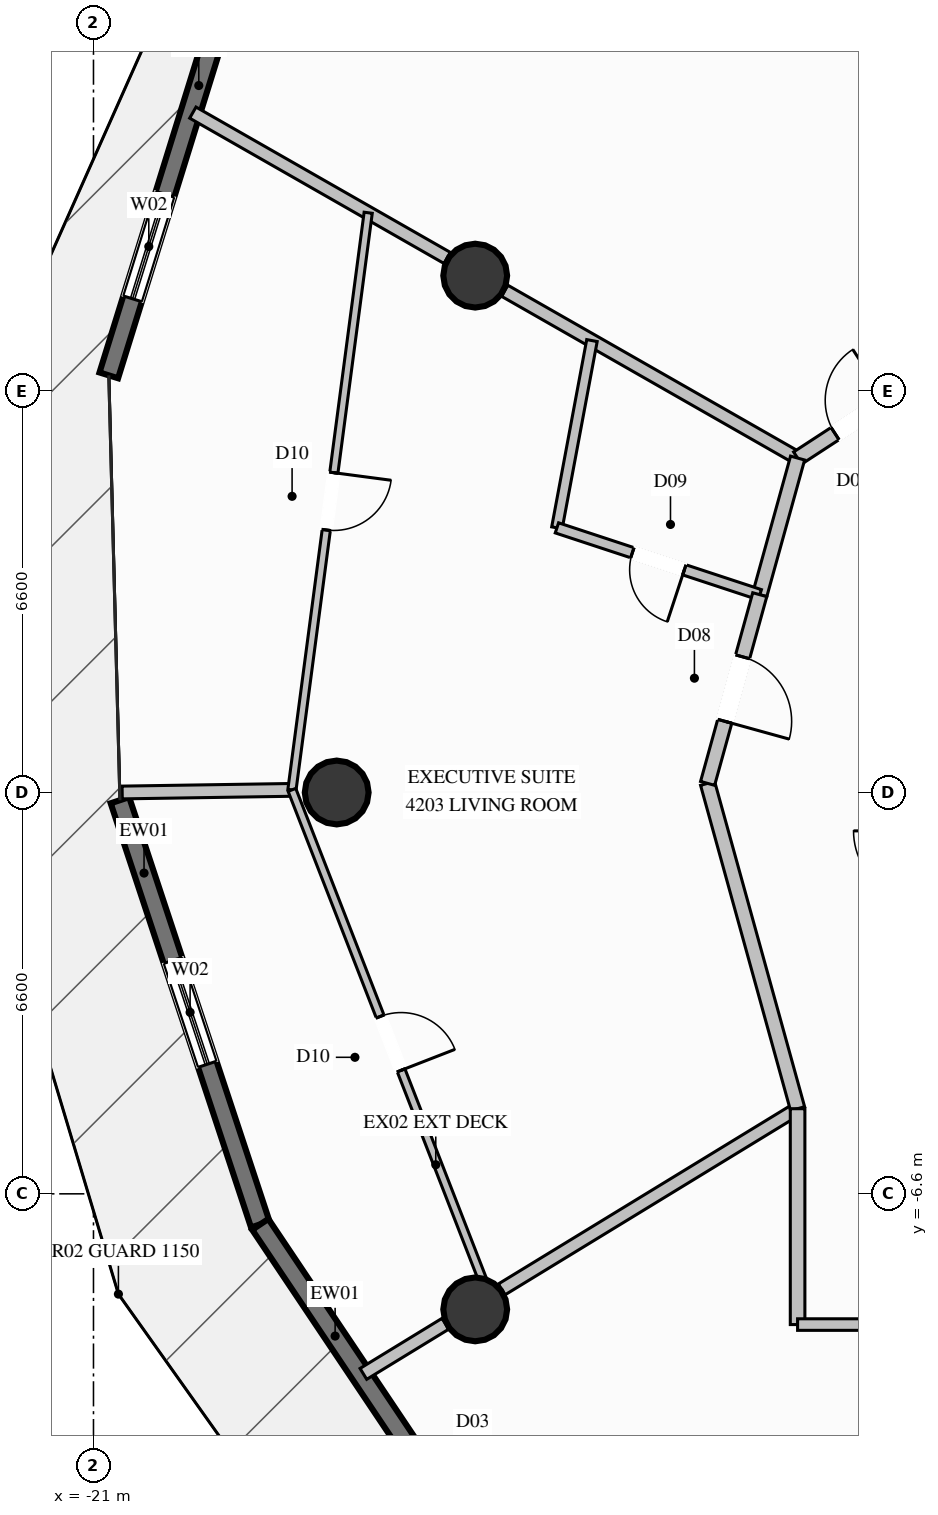
"""IFC4 building model, lengths in metres.
Left out: names, types, materials, properties, quantities, classifications, styles, units other than length and angle.
Written with IfcOpenShell. Run it as: python <this file> out.ifc"""

import sys

from ifc_helpers import new_model, si_unit, direction, frame, frame_2d, origin, origin_2d, place, context, subcontext, project, spatial, rectangle, circle, extrude, element, fill, save


model = new_model("IFC4")
c1 = context("Model", 3, precision=1e-05, world=origin(), true_north=direction((0.0, 1.0)))
c2 = subcontext(c1, "Body", "Model", "MODEL_VIEW")
j1 = project(units=[si_unit("LENGTHUNIT", "METRE"), si_unit("PLANEANGLEUNIT", "RADIAN")], contexts=[c1])
p1 = place(None, origin())
s1 = spatial("IfcSite", under=j1, at=p1, CompositionType="ELEMENT")
p2 = place(p1, origin())
s2 = spatial("IfcBuilding", under=s1, at=p2, CompositionType="ELEMENT")
p3 = place(p2, frame((0.0, 0.0, 156.6)))
s3 = spatial("IfcBuildingStorey", under=s2, at=p3, CompositionType="ELEMENT", Elevation=156.6)
for number, where, z_axis, x_axis in (
    (1, (-14.722, 8.5, 0.0), (0.0, 0.0, 1.0), (1.0, 0.0, 0.0)),
    (2, (-17.0, 0.0, 0.0), (0.0, 0.0, 1.0), (1.0, 0.0, 0.0)),
    (3, (-14.722, -8.5, 0.0), (0.0, 0.0, 1.0), (1.0, 0.0, 0.0)),
):
    element("IfcColumn", number, at=place(p3, frame(where, z_axis=z_axis, x_axis=x_axis)), inside=s3, PredefinedType="COLUMN", context=c2, shape_type="SweptSolid", body=[
        extrude(circle(Radius=0.525, at=origin_2d()), origin(), (0.0, 0.0, 1.0), 3.6),
    ])
p4 = place(p3, frame((-20.748, 6.86, 0.0), z_axis=(0.0, 0.0, 1.0), x_axis=(0.296513005153, 0.955028815154, 0.0)))
e4 = element("IfcWall", 4, at=p4, inside=s3, PredefinedType="SOLIDWALL", context=c2, shape_type="SweptSolid", body=[
    extrude(rectangle(XDim=6.613, YDim=0.32, at=frame_2d((3.307, 0.0))), origin(), (0.0, 0.0, 1.0), 3.35),
])
p5 = place(p4, frame((1.318, 0.0, 0.35)))
e5 = element("IfcOpeningElement", 5, at=p5, cuts=e4, PredefinedType="OPENING", context=c2, shape_type="SweptSolid", body=[
    extrude(rectangle(XDim=1.8, YDim=2.6, at=frame_2d((0.9, 1.3))), frame((0.0, 0.17, 0.0), z_axis=(0.0, -1.0, 0.0), x_axis=(1.0, 0.0, 0.0)), (0.0, 0.0, 1.0), 0.34),
])
p6 = place(p3, frame((-18.257, -7.102, 0.0), z_axis=(0.0, 0.0, 1.0), x_axis=(-0.314123527442, 0.949382119859, 0.0)))
e6 = element("IfcWall", 6, at=p6, inside=s3, PredefinedType="SOLIDWALL", context=c2, shape_type="SweptSolid", body=[
    extrude(rectangle(XDim=7.347, YDim=0.32, at=frame_2d((3.673, 0.0))), origin(), (0.0, 0.0, 1.0), 3.35),
])
p7 = place(p6, frame((2.773, 0.0, 0.35)))
e7 = element("IfcOpeningElement", 7, at=p7, cuts=e6, PredefinedType="OPENING", context=c2, shape_type="SweptSolid", body=[
    extrude(rectangle(XDim=1.8, YDim=2.6, at=frame_2d((0.9, 1.3))), frame((0.0, 0.17, 0.0), z_axis=(0.0, -1.0, 0.0), x_axis=(1.0, 0.0, 0.0)), (0.0, 0.0, 1.0), 0.34),
])
p8 = place(p3, frame((-14.049, -13.381, 0.0), z_axis=(0.0, 0.0, 1.0), x_axis=(-0.556711069725, 0.830706196465, 0.0)))
e8 = element("IfcWall", 8, at=p8, inside=s3, PredefinedType="SOLIDWALL", context=c2, shape_type="SweptSolid", body=[
    extrude(rectangle(XDim=7.559, YDim=0.32, at=frame_2d((3.779, 0.0))), origin(), (0.0, 0.0, 1.0), 3.35),
])
p9 = place(p8, frame((1.786, 0.0, 0.0)))
e9 = element("IfcOpeningElement", 9, at=p9, cuts=e8, PredefinedType="OPENING", context=c2, shape_type="SweptSolid", body=[
    extrude(rectangle(XDim=1.1, YDim=2.2, at=frame_2d((0.55, 1.1))), frame((0.0, 0.17, 0.0), z_axis=(0.0, -1.0, 0.0), x_axis=(1.0, 0.0, 0.0)), (0.0, 0.0, 1.0), 0.34),
])
p10 = place(p3, frame((-9.42, 5.5, 0.0), z_axis=(0.0, 0.0, 1.0), x_axis=(-0.868373112855, 0.495911420387, 0.0)))
e10 = element("IfcWall", 10, at=p10, inside=s3, PredefinedType="PARTITIONING", context=c2, shape_type="SweptSolid", body=[
    extrude(rectangle(XDim=5.547, YDim=0.21, at=frame_2d((2.774, 0.0))), origin(), (0.0, 0.0, 1.0), 2.717),
])
p11 = place(p3, frame((-15.183, 8.791, 0.0), z_axis=(0.0, 0.0, 1.0), x_axis=(-0.868271208713, 0.496089818601, 0.0)))
e11 = element("IfcWall", 11, at=p11, inside=s3, PredefinedType="PARTITIONING", context=c2, shape_type="SweptSolid", body=[
    extrude(rectangle(XDim=4.817, YDim=0.21, at=frame_2d((2.409, 0.0))), origin(), (0.0, 0.0, 1.0), 3.35),
])
p12 = place(p3, frame((-9.42, -5.2, 0.0), z_axis=(0.0, 0.0, 1.0), x_axis=(-0.853455334267, -0.521165993146, 0.0)))
e12 = element("IfcWall", 12, at=p12, inside=s3, PredefinedType="PARTITIONING", context=c2, shape_type="SweptSolid", body=[
    extrude(rectangle(XDim=5.703, YDim=0.21, at=frame_2d((2.852, 0.0))), origin(), (0.0, 0.0, 1.0), 2.717),
])
p13 = place(p3, frame((-15.213, -8.737, 0.0), z_axis=(0.0, 0.0, 1.0), x_axis=(-0.853251275715, -0.521500010058, 0.0)))
e13 = element("IfcWall", 13, at=p13, inside=s3, PredefinedType="PARTITIONING", context=c2, shape_type="SweptSolid", body=[
    extrude(rectangle(XDim=1.58, YDim=0.21, at=frame_2d((0.79, 0.0))), origin(), (0.0, 0.0, 1.0), 3.35),
])
p14 = place(p3, frame((-9.42, 5.5, 0.0), z_axis=(0.0, 0.0, 1.0), x_axis=(0.837571286912, 0.546328051029, 0.0)))
e14 = element("IfcWall", 14, at=p14, inside=s3, PredefinedType="PARTITIONING", context=c2, shape_type="SweptSolid", body=[
    extrude(rectangle(XDim=2.471, YDim=0.24, at=frame_2d((1.236, 0.0))), origin(), (0.0, 0.0, 1.0), 3.35),
])
p15 = place(p14, frame((0.736, 0.0, 0.0)))
e15 = element("IfcOpeningElement", 15, at=p15, cuts=e14, PredefinedType="OPENING", context=c2, shape_type="SweptSolid", body=[
    extrude(rectangle(XDim=1.0, YDim=2.2, at=frame_2d((0.5, 1.1))), frame((0.0, 0.13, 0.0), z_axis=(0.0, -1.0, 0.0), x_axis=(1.0, 0.0, 0.0)), (0.0, 0.0, 1.0), 0.26),
])
p16 = place(p3, frame((-9.42, 5.5, 0.0), z_axis=(0.0, 0.0, 1.0), x_axis=(-0.266801280383, -0.963751563831, 0.0)))
e16 = element("IfcWall", 16, at=p16, inside=s3, PredefinedType="PARTITIONING", context=c2, shape_type="SweptSolid", body=[
    extrude(rectangle(XDim=2.332, YDim=0.24, at=frame_2d((1.166, 0.0))), origin(), (0.0, 0.0, 1.0), 3.35),
])
p17 = place(p3, frame((-12.802, 7.432, 0.0), z_axis=(0.0, 0.0, 1.0), x_axis=(-0.183813348356, -0.982961165543, 0.0)))
e17 = element("IfcWall", 17, at=p17, inside=s3, PredefinedType="PLUMBINGWALL", context=c2, shape_type="SweptSolid", body=[
    extrude(rectangle(XDim=3.133, YDim=0.175, at=frame_2d((1.567, 0.0))), origin(), (0.0, 0.0, 1.0), 3.35),
])
p18 = place(p3, frame((-10.042, 3.253, 0.0), z_axis=(0.0, 0.0, 1.0), x_axis=(-0.949775824576, 0.312931115504, 0.0)))
e18 = element("IfcWall", 18, at=p18, inside=s3, PredefinedType="PLUMBINGWALL", context=c2, shape_type="SweptSolid", body=[
    extrude(rectangle(XDim=3.512, YDim=0.175, at=frame_2d((1.756, 0.0))), origin(), (0.0, 0.0, 1.0), 3.35),
])
p19 = place(p18, frame((1.306, 0.0, 0.0)))
e19 = element("IfcOpeningElement", 19, at=p19, cuts=e18, PredefinedType="OPENING", context=c2, shape_type="SweptSolid", body=[
    extrude(rectangle(XDim=0.9, YDim=2.1, at=frame_2d((0.45, 1.05))), frame((0.0, 0.098, 0.0), z_axis=(0.0, -1.0, 0.0), x_axis=(1.0, 0.0, 0.0)), (0.0, 0.0, 1.0), 0.195),
])
p20 = place(p3, frame((-17.736, 0.043, 0.0), z_axis=(0.0, 0.0, 1.0), x_axis=(-0.999881595037, -0.01538817425, 0.0)))
e20 = element("IfcWall", 20, at=p20, inside=s3, PredefinedType="PARTITIONING", context=c2, shape_type="SweptSolid", body=[
    extrude(rectangle(XDim=2.792, YDim=0.21, at=frame_2d((1.396, 0.0))), origin(), (0.0, 0.0, 1.0), 3.35),
])
p21 = place(p3, frame((-10.9, 0.15, 0.0), z_axis=(0.0, 0.0, 1.0), x_axis=(0.266625172958, -0.963800299411, 0.0)))
e21 = element("IfcWall", 21, at=p21, inside=s3, PredefinedType="PARTITIONING", context=c2, shape_type="SweptSolid", body=[
    extrude(rectangle(XDim=5.551, YDim=0.24, at=frame_2d((2.775, 0.0))), origin(), (0.0, 0.0, 1.0), 3.35),
])
p22 = place(p3, frame((-10.042, 3.253, 0.0), z_axis=(0.0, 0.0, 1.0), x_axis=(-0.266478138733, -0.963840962803, 0.0)))
e22 = element("IfcWall", 22, at=p22, inside=s3, PredefinedType="PARTITIONING", context=c2, shape_type="SweptSolid", body=[
    extrude(rectangle(XDim=3.219, YDim=0.24, at=frame_2d((1.61, 0.0))), origin(), (0.0, 0.0, 1.0), 3.35),
])
p23 = place(p22, frame((1.06, 0.0, 0.0)))
e23 = element("IfcOpeningElement", 23, at=p23, cuts=e22, PredefinedType="OPENING", context=c2, shape_type="SweptSolid", body=[
    extrude(rectangle(XDim=1.1, YDim=2.3, at=frame_2d((0.55, 1.15))), frame((0.0, 0.13, 0.0), z_axis=(0.0, -1.0, 0.0), x_axis=(1.0, 0.0, 0.0)), (0.0, 0.0, 1.0), 0.26),
])
p24 = place(p3, frame((-16.482, 9.534, 0.0), z_axis=(0.0, 0.0, 1.0), x_axis=(-0.131002685595, -0.991382013336, 0.0)))
e24 = element("IfcWall", 24, at=p24, inside=s3, PredefinedType="PARTITIONING", context=c2, shape_type="SweptSolid", body=[
    extrude(rectangle(XDim=9.573, YDim=0.135, at=frame_2d((4.787, 0.0))), origin(), (0.0, 0.0, 1.0), 3.35),
])
p25 = place(p24, frame((4.312, 0.0, 0.0)))
e25 = element("IfcOpeningElement", 25, at=p25, cuts=e24, PredefinedType="OPENING", context=c2, shape_type="SweptSolid", body=[
    extrude(rectangle(XDim=0.95, YDim=2.1, at=frame_2d((0.475, 1.05))), frame((0.0, 0.078, 0.0), z_axis=(0.0, -1.0, 0.0), x_axis=(1.0, 0.0, 0.0)), (0.0, 0.0, 1.0), 0.155),
])
p26 = place(p3, frame((-17.736, 0.043, 0.0), z_axis=(0.0, 0.0, 1.0), x_axis=(0.362756961883, -0.931883783851, 0.0)))
e26 = element("IfcWall", 26, at=p26, inside=s3, PredefinedType="PARTITIONING", context=c2, shape_type="SweptSolid", body=[
    extrude(rectangle(XDim=8.948, YDim=0.135, at=frame_2d((4.474, 0.0))), origin(), (0.0, 0.0, 1.0), 2.878),
])
p27 = place(p26, frame((3.999, 0.0, 0.0)))
e27 = element("IfcOpeningElement", 27, at=p27, cuts=e26, PredefinedType="OPENING", context=c2, shape_type="SweptSolid", body=[
    extrude(rectangle(XDim=0.95, YDim=2.1, at=frame_2d((0.475, 1.05))), frame((0.0, 0.078, 0.0), z_axis=(0.0, -1.0, 0.0), x_axis=(1.0, 0.0, 0.0)), (0.0, 0.0, 1.0), 0.155),
])
p28 = place(p3, frame((-9.42, -5.2, 0.0), z_axis=(0.0, 0.0, 1.0), x_axis=(0.0, -1.0, 0.0)))
e28 = element("IfcWall", 28, at=p28, inside=s3, PredefinedType="PARTITIONING", context=c2, shape_type="SweptSolid", body=[
    extrude(rectangle(XDim=3.55, YDim=0.24, at=frame_2d((1.775, 0.0))), origin(), (0.0, 0.0, 1.0), 3.35),
])
p29 = place(p3, frame((-9.42, -8.75, 0.0), z_axis=(0.0, 0.0, 1.0), x_axis=(1.0, 0.0, 0.0)))
e29 = element("IfcWall", 29, at=p29, inside=s3, PredefinedType="PARTITIONING", context=c2, shape_type="SweptSolid", body=[
    extrude(rectangle(XDim=4.239, YDim=0.19, at=frame_2d((2.12, 0.0))), origin(), (0.0, 0.0, 1.0), 3.35),
])
p30 = place(p29, frame((1.644, 0.0, 0.0)))
e30 = element("IfcOpeningElement", 30, at=p30, cuts=e29, PredefinedType="OPENING", context=c2, shape_type="SweptSolid", body=[
    extrude(rectangle(XDim=0.95, YDim=2.1, at=frame_2d((0.475, 1.05))), frame((0.0, 0.105, 0.0), z_axis=(0.0, -1.0, 0.0), x_axis=(1.0, 0.0, 0.0)), (0.0, 0.0, 1.0), 0.21),
])
p31 = place(p5, origin())
e31 = element("IfcWindow", 31, at=p31, inside=s3, PartitioningType="SINGLE_PANEL", PredefinedType="WINDOW", context=c2, shape_type="SweptSolid", body=[
    extrude(rectangle(XDim=1.8, YDim=2.6, at=frame_2d((0.9, 1.3))), frame((0.0, 0.03, 0.0), z_axis=(0.0, -1.0, 0.0), x_axis=(1.0, 0.0, 0.0)), (0.0, 0.0, 1.0), 0.06),
])
fill(e5, e31)
p32 = place(p7, origin())
e32 = element("IfcWindow", 32, at=p32, inside=s3, PartitioningType="SINGLE_PANEL", PredefinedType="WINDOW", context=c2, shape_type="SweptSolid", body=[
    extrude(rectangle(XDim=1.8, YDim=2.6, at=frame_2d((0.9, 1.3))), frame((0.0, 0.03, 0.0), z_axis=(0.0, -1.0, 0.0), x_axis=(1.0, 0.0, 0.0)), (0.0, 0.0, 1.0), 0.06),
])
fill(e7, e32)
p33 = place(p15, origin())
e33 = element("IfcDoor", 33, at=p33, inside=s3, OperationType="SINGLE_SWING_RIGHT", PredefinedType="DOOR", context=c2, shape_type="SweptSolid", body=[
    extrude(rectangle(XDim=1.0, YDim=2.2, at=frame_2d((0.5, 1.1))), frame((0.0, 0.025, 0.0), z_axis=(0.0, -1.0, 0.0), x_axis=(1.0, 0.0, 0.0)), (0.0, 0.0, 1.0), 0.05),
])
fill(e15, e33)
p34 = place(p19, origin())
e34 = element("IfcDoor", 34, at=p34, inside=s3, OperationType="SINGLE_SWING_LEFT", PredefinedType="DOOR", context=c2, shape_type="SweptSolid", body=[
    extrude(rectangle(XDim=0.9, YDim=2.1, at=frame_2d((0.45, 1.05))), frame((0.0, 0.025, 0.0), z_axis=(0.0, -1.0, 0.0), x_axis=(1.0, 0.0, 0.0)), (0.0, 0.0, 1.0), 0.05),
])
fill(e19, e34)
p35 = place(p23, origin())
e35 = element("IfcDoor", 35, at=p35, inside=s3, OperationType="SINGLE_SWING_RIGHT", PredefinedType="DOOR", context=c2, shape_type="SweptSolid", body=[
    extrude(rectangle(XDim=1.1, YDim=2.3, at=frame_2d((0.55, 1.15))), frame((0.0, 0.025, 0.0), z_axis=(0.0, -1.0, 0.0), x_axis=(1.0, 0.0, 0.0)), (0.0, 0.0, 1.0), 0.05),
])
fill(e23, e35)
p36 = place(p25, origin())
e36 = element("IfcDoor", 36, at=p36, inside=s3, OperationType="SINGLE_SWING_LEFT", PredefinedType="DOOR", context=c2, shape_type="SweptSolid", body=[
    extrude(rectangle(XDim=0.95, YDim=2.1, at=frame_2d((0.475, 1.05))), frame((0.0, 0.025, 0.0), z_axis=(0.0, -1.0, 0.0), x_axis=(1.0, 0.0, 0.0)), (0.0, 0.0, 1.0), 0.05),
])
fill(e25, e36)
p37 = place(p27, origin())
e37 = element("IfcDoor", 37, at=p37, inside=s3, OperationType="SINGLE_SWING_RIGHT", PredefinedType="DOOR", context=c2, shape_type="SweptSolid", body=[
    extrude(rectangle(XDim=0.95, YDim=2.1, at=frame_2d((0.475, 1.05))), frame((0.0, 0.025, 0.0), z_axis=(0.0, -1.0, 0.0), x_axis=(1.0, 0.0, 0.0)), (0.0, 0.0, 1.0), 0.05),
])
fill(e27, e37)
save(model, sys.argv[1])
